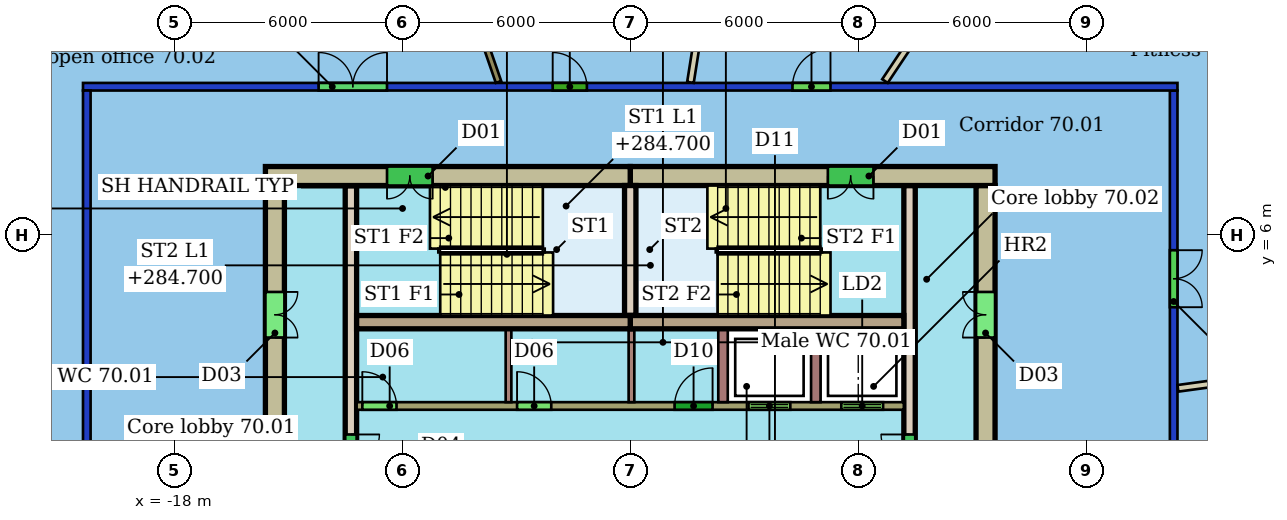
"""IFC4 building model, lengths in metres.
Left out: names, types, materials, properties, quantities, classifications, styles, units other than length and angle.
Written with IfcOpenShell. Run it as: python <this file> out.ifc"""

import sys

from ifc_helpers import new_model, si_unit, direction, frame, frame_2d, origin, place, context, subcontext, project, spatial, rectangle, extrude, element, fill, save


model = new_model("IFC4")
c1 = context("Model", 3, precision=1e-05, world=origin(), true_north=direction((0.0, 1.0)))
c2 = subcontext(c1, "Body", "Model", "MODEL_VIEW")
j1 = project(units=[si_unit("LENGTHUNIT", "METRE"), si_unit("PLANEANGLEUNIT", "RADIAN")], contexts=[c1])
p1 = place(None, origin())
s1 = spatial("IfcSite", under=j1, at=p1, CompositionType="ELEMENT")
p2 = place(p1, origin())
s2 = spatial("IfcBuilding", under=s1, at=p2, CompositionType="ELEMENT")
p3 = place(p2, frame((0.0, 0.0, 282.9)))
s3 = spatial("IfcBuildingStorey", under=s2, at=p3, CompositionType="ELEMENT", Elevation=282.9)
p4 = place(p3, frame((-20.3, -9.8, 0.0), z_axis=(0.0, 0.0, 1.0), x_axis=(0.0, 1.0, 0.0)))
e1 = element("IfcWall", 1, at=p4, inside=s3, PredefinedType="PARTITIONING", context=c2, shape_type="SweptSolid", body=[
    extrude(rectangle(XDim=19.6, YDim=0.2, at=frame_2d((9.8, 0.0))), origin(), (0.0, 0.0, 1.0), 3.1),
])
p5 = place(p4, frame((5.449, 0.0, 0.0)))
e2 = element("IfcOpeningElement", 2, at=p5, cuts=e1, PredefinedType="OPENING", context=c2, shape_type="SweptSolid", body=[
    extrude(rectangle(XDim=1.8, YDim=2.4, at=frame_2d((0.9, 1.2))), frame((0.0, 0.11, 0.0), z_axis=(0.0, -1.0, 0.0), x_axis=(1.0, 0.0, 0.0)), (0.0, 0.0, 1.0), 0.22),
])
p6 = place(p3, frame((-20.4, 9.9, 0.0), z_axis=(0.0, 0.0, 1.0), x_axis=(1.0, 0.0, 0.0)))
e3 = element("IfcWall", 3, at=p6, inside=s3, PredefinedType="PARTITIONING", context=c2, shape_type="SweptSolid", body=[
    extrude(rectangle(XDim=28.8, YDim=0.2, at=frame_2d((14.4, 0.0))), origin(), (0.0, 0.0, 1.0), 3.1),
])
p7 = place(p6, frame((12.36, 0.0, 0.0)))
e4 = element("IfcOpeningElement", 4, at=p7, cuts=e3, PredefinedType="OPENING", context=c2, shape_type="SweptSolid", body=[
    extrude(rectangle(XDim=0.9, YDim=2.1, at=frame_2d((0.45, 1.05))), frame((0.0, 0.11, 0.0), z_axis=(0.0, -1.0, 0.0), x_axis=(1.0, 0.0, 0.0)), (0.0, 0.0, 1.0), 0.22),
])
p8 = place(p6, frame((6.2, 0.0, 0.0)))
e5 = element("IfcOpeningElement", 5, at=p8, cuts=e3, PredefinedType="OPENING", context=c2, shape_type="SweptSolid", body=[
    extrude(rectangle(XDim=1.8, YDim=2.1, at=frame_2d((0.9, 1.05))), frame((0.0, 0.11, 0.0), z_axis=(0.0, -1.0, 0.0), x_axis=(1.0, 0.0, 0.0)), (0.0, 0.0, 1.0), 0.22),
])
p9 = place(p6, frame((18.669, 0.0, 0.0)))
e6 = element("IfcOpeningElement", 6, at=p9, cuts=e3, PredefinedType="OPENING", context=c2, shape_type="SweptSolid", body=[
    extrude(rectangle(XDim=1.0, YDim=2.1, at=frame_2d((0.5, 1.05))), frame((0.0, 0.11, 0.0), z_axis=(0.0, -1.0, 0.0), x_axis=(1.0, 0.0, 0.0)), (0.0, 0.0, 1.0), 0.22),
])
p10 = place(p3, frame((8.3, 9.8, 0.0), z_axis=(0.0, 0.0, 1.0), x_axis=(0.0, -1.0, 0.0)))
e7 = element("IfcWall", 7, at=p10, inside=s3, PredefinedType="PARTITIONING", context=c2, shape_type="SweptSolid", body=[
    extrude(rectangle(XDim=19.6, YDim=0.2, at=frame_2d((9.8, 0.0))), origin(), (0.0, 0.0, 1.0), 3.1),
])
p11 = place(p10, frame((14.189, 0.0, 0.0)))
e8 = element("IfcOpeningElement", 8, at=p11, cuts=e7, PredefinedType="OPENING", context=c2, shape_type="SweptSolid", body=[
    extrude(rectangle(XDim=1.5, YDim=2.1, at=frame_2d((0.75, 1.05))), frame((0.0, 0.11, 0.0), z_axis=(0.0, -1.0, 0.0), x_axis=(1.0, 0.0, 0.0)), (0.0, 0.0, 1.0), 0.22),
])
p12 = place(p10, frame((9.651, 0.0, 0.0)))
e9 = element("IfcOpeningElement", 9, at=p12, cuts=e7, PredefinedType="OPENING", context=c2, shape_type="SweptSolid", body=[
    extrude(rectangle(XDim=1.5, YDim=2.4, at=frame_2d((0.75, 1.2))), frame((0.0, 0.11, 0.0), z_axis=(0.0, -1.0, 0.0), x_axis=(1.0, 0.0, 0.0)), (0.0, 0.0, 1.0), 0.22),
])
p13 = place(p10, frame((4.201, 0.0, 0.0)))
e10 = element("IfcOpeningElement", 10, at=p13, cuts=e7, PredefinedType="OPENING", context=c2, shape_type="SweptSolid", body=[
    extrude(rectangle(XDim=1.5, YDim=2.1, at=frame_2d((0.75, 1.05))), frame((0.0, 0.11, 0.0), z_axis=(0.0, -1.0, 0.0), x_axis=(1.0, 0.0, 0.0)), (0.0, 0.0, 1.0), 0.22),
])
p14 = place(p3, frame((-2.196, 24.038, 0.0), z_axis=(0.0, 0.0, 1.0), x_axis=(-0.156301629097, -0.987709370585, 0.0)))
e11 = element("IfcWall", 11, at=p14, inside=s3, PredefinedType="PARTITIONING", context=c2, shape_type="SweptSolid", body=[
    extrude(rectangle(XDim=14.198, YDim=0.175, at=frame_2d((7.099, 0.0))), origin(), (0.0, 0.0, 1.0), 3.45),
])
p15 = place(p3, frame((-13.249, 20.965, 0.0), z_axis=(0.0, 0.0, 1.0), x_axis=(0.32678024546, -0.945100349792, 0.0)))
e12 = element("IfcWall", 12, at=p15, inside=s3, PredefinedType="PARTITIONING", context=c2, shape_type="SweptSolid", body=[
    extrude(rectangle(XDim=11.576, YDim=0.15, at=frame_2d((5.788, 0.0))), origin(), (0.0, 0.0, 1.0), 3.45),
])
p16 = place(p3, frame((15.412, 2.918, 0.0), z_axis=(0.0, 0.0, 1.0), x_axis=(-0.99084383144, -0.135012968627, 0.0)))
e13 = element("IfcWall", 13, at=p16, inside=s3, PredefinedType="PARTITIONING", context=c2, shape_type="SweptSolid", body=[
    extrude(rectangle(XDim=7.065, YDim=0.175, at=frame_2d((3.532, 0.0))), origin(), (0.0, 0.0, 1.0), 3.45),
])
p17 = place(p3, frame((7.807, 20.697, 0.0), z_axis=(0.0, 0.0, 1.0), x_axis=(-0.55495104707, -0.83188300581, 0.0)))
e14 = element("IfcWall", 14, at=p17, inside=s3, PredefinedType="PARTITIONING", context=c2, shape_type="SweptSolid", body=[
    extrude(rectangle(XDim=12.801, YDim=0.175, at=frame_2d((6.4, 0.0))), origin(), (0.0, 0.0, 1.0), 3.45),
])
p18 = place(p3, frame((3.6, 7.55, 0.0), z_axis=(0.0, 0.0, 1.0), x_axis=(-1.0, 0.0, 0.0)))
e15 = element("IfcWall", 15, at=p18, inside=s3, PredefinedType="SHEAR", context=c2, shape_type="SweptSolid", body=[
    extrude(rectangle(XDim=9.6, YDim=0.5, at=frame_2d((4.8, 0.0))), origin(), (0.0, 0.0, 1.0), 3.3),
])
p19 = place(p18, frame((3.2, 0.0, 0.0)))
e16 = element("IfcOpeningElement", 16, at=p19, cuts=e15, PredefinedType="OPENING", context=c2, shape_type="SweptSolid", body=[
    extrude(rectangle(XDim=1.2, YDim=2.1, at=frame_2d((0.6, 1.05))), frame((0.0, 0.26, 0.0), z_axis=(0.0, -1.0, 0.0), x_axis=(1.0, 0.0, 0.0)), (0.0, 0.0, 1.0), 0.52),
])
p20 = place(p3, frame((-6.0, 7.55, 0.0), z_axis=(0.0, 0.0, 1.0), x_axis=(-1.0, 0.0, 0.0)))
e17 = element("IfcWall", 17, at=p20, inside=s3, PredefinedType="SHEAR", context=c2, shape_type="SweptSolid", body=[
    extrude(rectangle(XDim=9.6, YDim=0.5, at=frame_2d((4.8, 0.0))), origin(), (0.0, 0.0, 1.0), 3.3),
])
p21 = place(p20, frame((5.2, 0.0, 0.0)))
e18 = element("IfcOpeningElement", 18, at=p21, cuts=e17, PredefinedType="OPENING", context=c2, shape_type="SweptSolid", body=[
    extrude(rectangle(XDim=1.2, YDim=2.1, at=frame_2d((0.6, 1.05))), frame((0.0, 0.26, 0.0), z_axis=(0.0, -1.0, 0.0), x_axis=(1.0, 0.0, 0.0)), (0.0, 0.0, 1.0), 0.52),
])
p22 = place(p3, frame((-15.35, 7.3, 0.0), z_axis=(0.0, 0.0, 1.0), x_axis=(0.0, -1.0, 0.0)))
e19 = element("IfcWall", 19, at=p22, inside=s3, PredefinedType="SHEAR", context=c2, shape_type="SweptSolid", body=[
    extrude(rectangle(XDim=14.6, YDim=0.5, at=frame_2d((7.3, 0.0))), origin(), (0.0, 0.0, 1.0), 3.3),
])
p23 = place(p22, frame((10.6, 0.0, 0.0)))
e20 = element("IfcOpeningElement", 20, at=p23, cuts=e19, PredefinedType="OPENING", context=c2, shape_type="SweptSolid", body=[
    extrude(rectangle(XDim=1.2, YDim=2.1, at=frame_2d((0.6, 1.05))), frame((0.0, 0.26, 0.0), z_axis=(0.0, -1.0, 0.0), x_axis=(1.0, 0.0, 0.0)), (0.0, 0.0, 1.0), 0.52),
])
p24 = place(p22, frame((2.8, 0.0, 0.0)))
e21 = element("IfcOpeningElement", 21, at=p24, cuts=e19, PredefinedType="OPENING", context=c2, shape_type="SweptSolid", body=[
    extrude(rectangle(XDim=1.2, YDim=2.1, at=frame_2d((0.6, 1.05))), frame((0.0, 0.26, 0.0), z_axis=(0.0, -1.0, 0.0), x_axis=(1.0, 0.0, 0.0)), (0.0, 0.0, 1.0), 0.52),
])
p25 = place(p3, frame((3.35, -7.3, 0.0), z_axis=(0.0, 0.0, 1.0), x_axis=(0.0, 1.0, 0.0)))
e22 = element("IfcWall", 22, at=p25, inside=s3, PredefinedType="SHEAR", context=c2, shape_type="SweptSolid", body=[
    extrude(rectangle(XDim=14.6, YDim=0.5, at=frame_2d((7.3, 0.0))), origin(), (0.0, 0.0, 1.0), 3.3),
])
p26 = place(p25, frame((2.8, 0.0, 0.0)))
e23 = element("IfcOpeningElement", 23, at=p26, cuts=e22, PredefinedType="OPENING", context=c2, shape_type="SweptSolid", body=[
    extrude(rectangle(XDim=1.2, YDim=2.1, at=frame_2d((0.6, 1.05))), frame((0.0, 0.26, 0.0), z_axis=(0.0, -1.0, 0.0), x_axis=(1.0, 0.0, 0.0)), (0.0, 0.0, 1.0), 0.52),
])
p27 = place(p25, frame((10.6, 0.0, 0.0)))
e24 = element("IfcOpeningElement", 24, at=p27, cuts=e22, PredefinedType="OPENING", context=c2, shape_type="SweptSolid", body=[
    extrude(rectangle(XDim=1.2, YDim=2.1, at=frame_2d((0.6, 1.05))), frame((0.0, 0.26, 0.0), z_axis=(0.0, -1.0, 0.0), x_axis=(1.0, 0.0, 0.0)), (0.0, 0.0, 1.0), 0.52),
])
for number, where, z_axis, x_axis in (
    (25, (-13.2, 3.705, 0.0), (0.0, 0.0, 1.0), (1.0, 0.0, 0.0)),
    (26, (-6.0, 3.705, 0.0), (0.0, 0.0, 1.0), (1.0, 0.0, 0.0)),
):
    element("IfcWall", number, at=place(p3, frame(where, z_axis=z_axis, x_axis=x_axis)), inside=s3, PredefinedType="SHEAR", context=c2, shape_type="SweptSolid", body=[
        extrude(rectangle(XDim=7.2, YDim=0.35, at=frame_2d((3.6, 0.0))), origin(), (0.0, 0.0, 1.0), 3.3),
    ])
p28 = place(p3, frame((-13.35, 7.3, 0.0), z_axis=(0.0, 0.0, 1.0), x_axis=(0.0, -1.0, 0.0)))
e27 = element("IfcWall", 27, at=p28, inside=s3, PredefinedType="SHEAR", context=c2, shape_type="SweptSolid", body=[
    extrude(rectangle(XDim=14.6, YDim=0.3, at=frame_2d((7.3, 0.0))), origin(), (0.0, 0.0, 1.0), 3.3),
])
p29 = place(p28, frame((6.55, 0.0, 0.0)))
e28 = element("IfcOpeningElement", 28, at=p29, cuts=e27, PredefinedType="OPENING", context=c2, shape_type="SweptSolid", body=[
    extrude(rectangle(XDim=1.5, YDim=2.1, at=frame_2d((0.75, 1.05))), frame((0.0, 0.16, 0.0), z_axis=(0.0, -1.0, 0.0), x_axis=(1.0, 0.0, 0.0)), (0.0, 0.0, 1.0), 0.32),
])
p30 = place(p3, frame((1.35, -7.3, 0.0), z_axis=(0.0, 0.0, 1.0), x_axis=(0.0, 1.0, 0.0)))
e29 = element("IfcWall", 29, at=p30, inside=s3, PredefinedType="SHEAR", context=c2, shape_type="SweptSolid", body=[
    extrude(rectangle(XDim=14.6, YDim=0.3, at=frame_2d((7.3, 0.0))), origin(), (0.0, 0.0, 1.0), 3.3),
])
p31 = place(p30, frame((1.21, 0.0, 0.0)))
e30 = element("IfcOpeningElement", 30, at=p31, cuts=e29, PredefinedType="OPENING", context=c2, shape_type="SweptSolid", body=[
    extrude(rectangle(XDim=1.0, YDim=2.1, at=frame_2d((0.5, 1.05))), frame((0.0, 0.16, 0.0), z_axis=(0.0, -1.0, 0.0), x_axis=(1.0, 0.0, 0.0)), (0.0, 0.0, 1.0), 0.32),
])
p32 = place(p30, frame((6.55, 0.0, 0.0)))
e31 = element("IfcOpeningElement", 31, at=p32, cuts=e29, PredefinedType="OPENING", context=c2, shape_type="SweptSolid", body=[
    extrude(rectangle(XDim=1.5, YDim=2.1, at=frame_2d((0.75, 1.05))), frame((0.0, 0.16, 0.0), z_axis=(0.0, -1.0, 0.0), x_axis=(1.0, 0.0, 0.0)), (0.0, 0.0, 1.0), 0.32),
])
p33 = place(p3, frame((-13.2, 1.5, 0.0), z_axis=(0.0, 0.0, 1.0), x_axis=(1.0, 0.0, 0.0)))
e32 = element("IfcWall", 32, at=p33, inside=s3, PredefinedType="SHEAR", context=c2, shape_type="SweptSolid", body=[
    extrude(rectangle(XDim=14.4, YDim=0.2, at=frame_2d((7.2, 0.0))), origin(), (0.0, 0.0, 1.0), 3.3),
])
p34 = place(p33, frame((10.312, 0.0, 0.0)))
e33 = element("IfcOpeningElement", 33, at=p34, cuts=e32, PredefinedType="OPENING", context=c2, shape_type="SweptSolid", body=[
    extrude(rectangle(XDim=1.1, YDim=2.1, at=frame_2d((0.55, 1.05))), frame((0.0, 0.11, 0.0), z_axis=(0.0, -1.0, 0.0), x_axis=(1.0, 0.0, 0.0)), (0.0, 0.0, 1.0), 0.22),
])
p35 = place(p33, frame((12.754, 0.0, 0.0)))
e34 = element("IfcOpeningElement", 34, at=p35, cuts=e32, PredefinedType="OPENING", context=c2, shape_type="SweptSolid", body=[
    extrude(rectangle(XDim=1.1, YDim=2.1, at=frame_2d((0.55, 1.05))), frame((0.0, 0.11, 0.0), z_axis=(0.0, -1.0, 0.0), x_axis=(1.0, 0.0, 0.0)), (0.0, 0.0, 1.0), 0.22),
])
p36 = place(p33, frame((0.15, 0.0, 0.0)))
e35 = element("IfcOpeningElement", 35, at=p36, cuts=e32, PredefinedType="OPENING", context=c2, shape_type="SweptSolid", body=[
    extrude(rectangle(XDim=0.9, YDim=2.1, at=frame_2d((0.45, 1.05))), frame((0.0, 0.11, 0.0), z_axis=(0.0, -1.0, 0.0), x_axis=(1.0, 0.0, 0.0)), (0.0, 0.0, 1.0), 0.22),
])
p37 = place(p33, frame((4.222, 0.0, 0.0)))
e36 = element("IfcOpeningElement", 36, at=p37, cuts=e32, PredefinedType="OPENING", context=c2, shape_type="SweptSolid", body=[
    extrude(rectangle(XDim=0.9, YDim=2.1, at=frame_2d((0.45, 1.05))), frame((0.0, 0.11, 0.0), z_axis=(0.0, -1.0, 0.0), x_axis=(1.0, 0.0, 0.0)), (0.0, 0.0, 1.0), 0.22),
])
p38 = place(p33, frame((8.367, 0.0, 0.0)))
e37 = element("IfcOpeningElement", 37, at=p38, cuts=e32, PredefinedType="OPENING", context=c2, shape_type="SweptSolid", body=[
    extrude(rectangle(XDim=1.0, YDim=2.1, at=frame_2d((0.5, 1.05))), frame((0.0, 0.11, 0.0), z_axis=(0.0, -1.0, 0.0), x_axis=(1.0, 0.0, 0.0)), (0.0, 0.0, 1.0), 0.22),
])
p39 = place(p3, frame((-6.0, 3.88, 0.0), z_axis=(0.0, 0.0, 1.0), x_axis=(0.0, 1.0, 0.0)))
e38 = element("IfcWall", 38, at=p39, inside=s3, PredefinedType="SHEAR", context=c2, shape_type="SweptSolid", body=[
    extrude(rectangle(XDim=3.42, YDim=0.3, at=frame_2d((1.71, 0.0))), origin(), (0.0, 0.0, 1.0), 3.3),
])
for number, where, z_axis, x_axis in (
    (39, (-3.558, 1.6, 0.0), (0.0, 0.0, 1.0), (0.0, 1.0, 0.0)),
    (40, (-1.117, 1.6, 0.0), (0.0, 0.0, 1.0), (0.0, 1.0, 0.0)),
):
    element("IfcWall", number, at=place(p3, frame(where, z_axis=z_axis, x_axis=x_axis)), inside=s3, PredefinedType="SHEAR", context=c2, shape_type="SweptSolid", body=[
        extrude(rectangle(XDim=1.93, YDim=0.25, at=frame_2d((0.965, 0.0))), origin(), (0.0, 0.0, 1.0), 3.3),
    ])
for number, where, z_axis, x_axis in (
    (41, (-9.203, 1.6, 0.0), (0.0, 0.0, 1.0), (0.0, 1.0, 0.0)),
    (42, (-5.967, 1.6, 0.0), (0.0, 0.0, 1.0), (0.0, 1.0, 0.0)),
):
    element("IfcWall", number, at=place(p3, frame(where, z_axis=z_axis, x_axis=x_axis)), inside=s3, PredefinedType="PARTITIONING", context=c2, shape_type="SweptSolid", body=[
        extrude(rectangle(XDim=1.93, YDim=0.15, at=frame_2d((0.965, 0.0))), origin(), (0.0, 0.0, 1.0), 3.3),
    ])
p40 = place(p7, origin())
e43 = element("IfcDoor", 43, at=p40, inside=s3, OperationType="SINGLE_SWING_LEFT", PredefinedType="DOOR", context=c2, shape_type="SweptSolid", body=[
    extrude(rectangle(XDim=0.9, YDim=2.1, at=frame_2d((0.45, 1.05))), frame((0.0, 0.025, 0.0), z_axis=(0.0, -1.0, 0.0), x_axis=(1.0, 0.0, 0.0)), (0.0, 0.0, 1.0), 0.05),
])
fill(e4, e43)
p41 = place(p8, origin())
e44 = element("IfcDoor", 44, at=p41, inside=s3, OperationType="DOUBLE_DOOR_SINGLE_SWING", PredefinedType="DOOR", context=c2, shape_type="SweptSolid", body=[
    extrude(rectangle(XDim=1.8, YDim=2.1, at=frame_2d((0.9, 1.05))), frame((0.0, 0.025, 0.0), z_axis=(0.0, -1.0, 0.0), x_axis=(1.0, 0.0, 0.0)), (0.0, 0.0, 1.0), 0.05),
])
fill(e5, e44)
p42 = place(p13, origin())
e45 = element("IfcDoor", 45, at=p42, inside=s3, OperationType="DOUBLE_DOOR_SINGLE_SWING", PredefinedType="DOOR", context=c2, shape_type="SweptSolid", body=[
    extrude(rectangle(XDim=1.5, YDim=2.1, at=frame_2d((0.75, 1.05))), frame((0.0, 0.025, 0.0), z_axis=(0.0, -1.0, 0.0), x_axis=(1.0, 0.0, 0.0)), (0.0, 0.0, 1.0), 0.05),
])
fill(e10, e45)
p43 = place(p9, origin())
e46 = element("IfcDoor", 46, at=p43, inside=s3, OperationType="SINGLE_SWING_RIGHT", PredefinedType="DOOR", context=c2, shape_type="SweptSolid", body=[
    extrude(rectangle(XDim=1.0, YDim=2.1, at=frame_2d((0.5, 1.05))), frame((0.0, 0.025, 0.0), z_axis=(0.0, -1.0, 0.0), x_axis=(1.0, 0.0, 0.0)), (0.0, 0.0, 1.0), 0.05),
])
fill(e6, e46)
p44 = place(p19, origin())
e47 = element("IfcDoor", 47, at=p44, inside=s3, OperationType="DOUBLE_DOOR_SINGLE_SWING", PredefinedType="NOTDEFINED", context=c2, shape_type="SweptSolid", body=[
    extrude(rectangle(XDim=1.2, YDim=2.1, at=frame_2d((0.6, 1.05))), frame((0.0, 0.025, 0.0), z_axis=(0.0, -1.0, 0.0), x_axis=(1.0, 0.0, 0.0)), (0.0, 0.0, 1.0), 0.05),
])
fill(e16, e47)
p45 = place(p21, origin())
e48 = element("IfcDoor", 48, at=p45, inside=s3, OperationType="DOUBLE_DOOR_SINGLE_SWING", PredefinedType="NOTDEFINED", context=c2, shape_type="SweptSolid", body=[
    extrude(rectangle(XDim=1.2, YDim=2.1, at=frame_2d((0.6, 1.05))), frame((0.0, 0.025, 0.0), z_axis=(0.0, -1.0, 0.0), x_axis=(1.0, 0.0, 0.0)), (0.0, 0.0, 1.0), 0.05),
])
fill(e18, e48)
p46 = place(p24, origin())
e49 = element("IfcDoor", 49, at=p46, inside=s3, OperationType="DOUBLE_DOOR_SINGLE_SWING", PredefinedType="NOTDEFINED", context=c2, shape_type="SweptSolid", body=[
    extrude(rectangle(XDim=1.2, YDim=2.1, at=frame_2d((0.6, 1.05))), frame((0.0, 0.025, 0.0), z_axis=(0.0, -1.0, 0.0), x_axis=(1.0, 0.0, 0.0)), (0.0, 0.0, 1.0), 0.05),
])
fill(e21, e49)
p47 = place(p27, origin())
e50 = element("IfcDoor", 50, at=p47, inside=s3, OperationType="DOUBLE_DOOR_SINGLE_SWING", PredefinedType="NOTDEFINED", context=c2, shape_type="SweptSolid", body=[
    extrude(rectangle(XDim=1.2, YDim=2.1, at=frame_2d((0.6, 1.05))), frame((0.0, 0.025, 0.0), z_axis=(0.0, -1.0, 0.0), x_axis=(1.0, 0.0, 0.0)), (0.0, 0.0, 1.0), 0.05),
])
fill(e24, e50)
p48 = place(p29, origin())
e51 = element("IfcDoor", 51, at=p48, inside=s3, OperationType="DOUBLE_DOOR_SINGLE_SWING", PredefinedType="NOTDEFINED", context=c2, shape_type="SweptSolid", body=[
    extrude(rectangle(XDim=1.5, YDim=2.1, at=frame_2d((0.75, 1.05))), frame((0.0, 0.025, 0.0), z_axis=(0.0, -1.0, 0.0), x_axis=(1.0, 0.0, 0.0)), (0.0, 0.0, 1.0), 0.05),
])
fill(e28, e51)
p49 = place(p32, origin())
e52 = element("IfcDoor", 52, at=p49, inside=s3, OperationType="DOUBLE_DOOR_SINGLE_SWING", PredefinedType="NOTDEFINED", context=c2, shape_type="SweptSolid", body=[
    extrude(rectangle(XDim=1.5, YDim=2.1, at=frame_2d((0.75, 1.05))), frame((0.0, 0.025, 0.0), z_axis=(0.0, -1.0, 0.0), x_axis=(1.0, 0.0, 0.0)), (0.0, 0.0, 1.0), 0.05),
])
fill(e31, e52)
p50 = place(p34, origin())
e53 = element("IfcDoor", 53, at=p50, inside=s3, OperationType="DOUBLE_DOOR_SLIDING", PredefinedType="NOTDEFINED", context=c2, shape_type="SweptSolid", body=[
    extrude(rectangle(XDim=1.1, YDim=2.1, at=frame_2d((0.55, 1.05))), frame((0.0, 0.025, 0.0), z_axis=(0.0, -1.0, 0.0), x_axis=(1.0, 0.0, 0.0)), (0.0, 0.0, 1.0), 0.05),
])
fill(e33, e53)
p51 = place(p35, origin())
e54 = element("IfcDoor", 54, at=p51, inside=s3, OperationType="DOUBLE_DOOR_SLIDING", PredefinedType="NOTDEFINED", context=c2, shape_type="SweptSolid", body=[
    extrude(rectangle(XDim=1.1, YDim=2.1, at=frame_2d((0.55, 1.05))), frame((0.0, 0.025, 0.0), z_axis=(0.0, -1.0, 0.0), x_axis=(1.0, 0.0, 0.0)), (0.0, 0.0, 1.0), 0.05),
])
fill(e34, e54)
p52 = place(p36, origin())
e55 = element("IfcDoor", 55, at=p52, inside=s3, OperationType="SINGLE_SWING_LEFT", PredefinedType="NOTDEFINED", context=c2, shape_type="SweptSolid", body=[
    extrude(rectangle(XDim=0.9, YDim=2.1, at=frame_2d((0.45, 1.05))), frame((0.0, 0.025, 0.0), z_axis=(0.0, -1.0, 0.0), x_axis=(1.0, 0.0, 0.0)), (0.0, 0.0, 1.0), 0.05),
])
fill(e35, e55)
p53 = place(p37, origin())
e56 = element("IfcDoor", 56, at=p53, inside=s3, OperationType="SINGLE_SWING_LEFT", PredefinedType="NOTDEFINED", context=c2, shape_type="SweptSolid", body=[
    extrude(rectangle(XDim=0.9, YDim=2.1, at=frame_2d((0.45, 1.05))), frame((0.0, 0.025, 0.0), z_axis=(0.0, -1.0, 0.0), x_axis=(1.0, 0.0, 0.0)), (0.0, 0.0, 1.0), 0.05),
])
fill(e36, e56)
p54 = place(p38, origin())
e57 = element("IfcDoor", 57, at=p54, inside=s3, OperationType="SINGLE_SWING_RIGHT", PredefinedType="NOTDEFINED", context=c2, shape_type="SweptSolid", body=[
    extrude(rectangle(XDim=1.0, YDim=2.1, at=frame_2d((0.5, 1.05))), frame((0.0, 0.025, 0.0), z_axis=(0.0, -1.0, 0.0), x_axis=(1.0, 0.0, 0.0)), (0.0, 0.0, 1.0), 0.05),
])
fill(e37, e57)
save(model, sys.argv[1])
